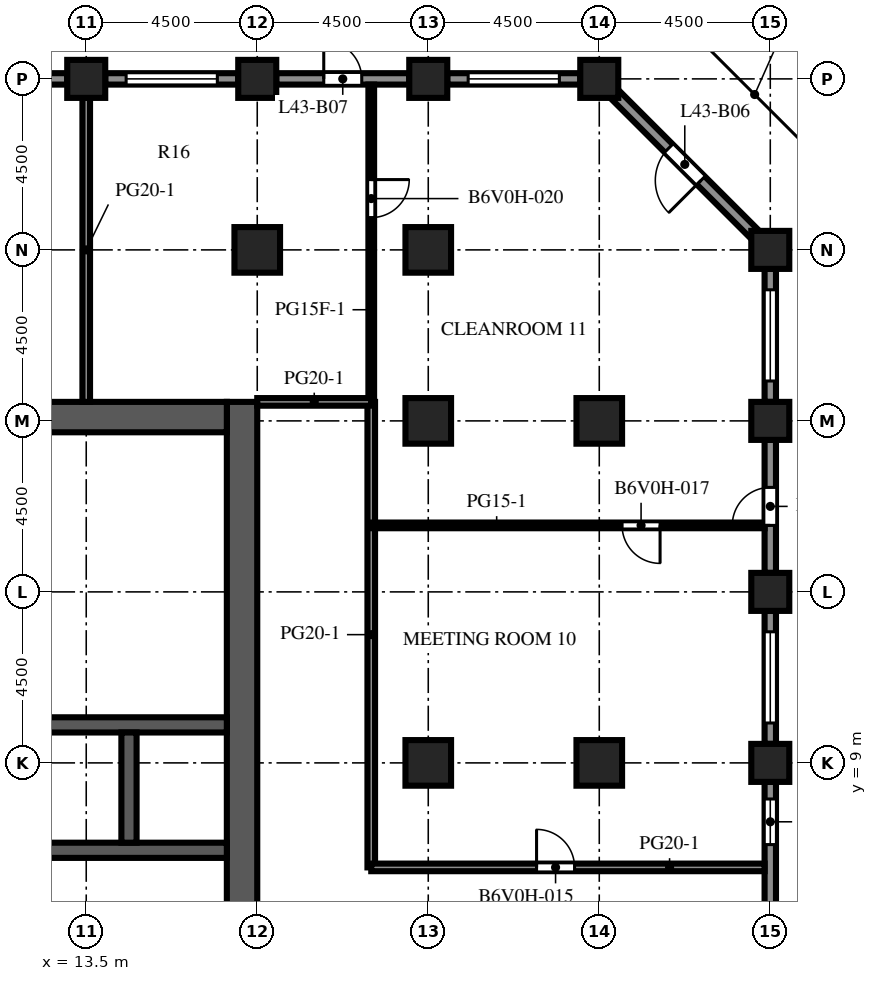
"""IFC4 building model, lengths in metres.
Left out: names, types, materials, properties, quantities, classifications, styles, units other than length and angle.
Written with IfcOpenShell. Run it as: python <this file> out.ifc"""

import sys

from ifc_helpers import new_model, si_unit, direction, frame, frame_2d, origin, origin_2d, place, context, subcontext, project, spatial, rectangle, extrude, element, fill, save


model = new_model("IFC4")
c1 = context("Model", 3, precision=1e-05, world=origin(), true_north=direction((0.0, 1.0)))
c2 = subcontext(c1, "Body", "Model", "MODEL_VIEW")
j1 = project(units=[si_unit("LENGTHUNIT", "METRE"), si_unit("PLANEANGLEUNIT", "RADIAN")], contexts=[c1])
p1 = place(None, origin())
s1 = spatial("IfcSite", under=j1, at=p1, CompositionType="ELEMENT")
p2 = place(p1, origin())
s2 = spatial("IfcBuilding", under=s1, at=p2, CompositionType="ELEMENT")
p3 = place(p2, frame((0.0, 0.0, 191.5)))
s3 = spatial("IfcBuildingStorey", under=s2, at=p3, CompositionType="ELEMENT", Elevation=191.5)
for number, where, z_axis, x_axis in (
    (1, (13.5, 27.0, 0.0), (0.0, 0.0, 1.0), (1.0, 0.0, 0.0)),
    (2, (18.0, 27.0, 0.0), (0.0, 0.0, 1.0), (1.0, 0.0, 0.0)),
    (3, (22.5, 27.0, 0.0), (0.0, 0.0, 1.0), (1.0, 0.0, 0.0)),
    (4, (27.0, 27.0, 0.0), (0.0, 0.0, 1.0), (1.0, 0.0, 0.0)),
):
    element("IfcColumn", number, at=place(p3, frame(where, z_axis=z_axis, x_axis=x_axis)), inside=s3, PredefinedType="COLUMN", context=c2, shape_type="SweptSolid", body=[
        extrude(rectangle(XDim=1.0, YDim=1.0, at=origin_2d()), origin(), (0.0, 0.0, 1.0), 4.1),
    ])
for number, where, z_axis, x_axis in (
    (5, (31.5, 9.0, -0.45), (0.0, 0.0, 1.0), (1.0, 0.0, 0.0)),
    (6, (31.5, 13.5, -0.45), (0.0, 0.0, 1.0), (1.0, 0.0, 0.0)),
    (7, (31.5, 18.0, -0.45), (0.0, 0.0, 1.0), (1.0, 0.0, 0.0)),
    (8, (31.5, 22.5, -0.45), (0.0, 0.0, 1.0), (1.0, 0.0, 0.0)),
):
    element("IfcColumn", number, at=place(p3, frame(where, z_axis=z_axis, x_axis=x_axis)), inside=s3, PredefinedType="COLUMN", context=c2, shape_type="SweptSolid", body=[
        extrude(rectangle(XDim=1.0, YDim=1.0, at=origin_2d()), origin(), (0.0, 0.0, 1.0), 4.55),
    ])
p4 = place(p3, frame((18.0, 22.5, 0.0), z_axis=(0.0, 0.0, 1.0), x_axis=(1.0, 0.0, 0.0)))
e9 = element("IfcColumn", 9, at=p4, inside=s3, PredefinedType="COLUMN", context=c2, shape_type="SweptSolid", body=[
    extrude(rectangle(XDim=1.2, YDim=1.2, at=origin_2d()), origin(), (0.0, 0.0, 1.0), 4.1),
])
for number, where, z_axis, x_axis in (
    (10, (22.5, 9.0, -0.45), (0.0, 0.0, 1.0), (1.0, 0.0, 0.0)),
    (11, (22.5, 18.0, -0.45), (0.0, 0.0, 1.0), (1.0, 0.0, 0.0)),
):
    element("IfcColumn", number, at=place(p3, frame(where, z_axis=z_axis, x_axis=x_axis)), inside=s3, PredefinedType="COLUMN", context=c2, shape_type="SweptSolid", body=[
        extrude(rectangle(XDim=1.2, YDim=1.2, at=origin_2d()), origin(), (0.0, 0.0, 1.0), 4.55),
    ])
p5 = place(p3, frame((22.5, 22.5, 0.0), z_axis=(0.0, 0.0, 1.0), x_axis=(1.0, 0.0, 0.0)))
e12 = element("IfcColumn", 12, at=p5, inside=s3, PredefinedType="COLUMN", context=c2, shape_type="SweptSolid", body=[
    extrude(rectangle(XDim=1.2, YDim=1.2, at=origin_2d()), origin(), (0.0, 0.0, 1.0), 4.1),
])
for number, where, z_axis, x_axis in (
    (13, (27.0, 9.0, -0.45), (0.0, 0.0, 1.0), (1.0, 0.0, 0.0)),
    (14, (27.0, 18.0, -0.45), (0.0, 0.0, 1.0), (1.0, 0.0, 0.0)),
):
    element("IfcColumn", number, at=place(p3, frame(where, z_axis=z_axis, x_axis=x_axis)), inside=s3, PredefinedType="COLUMN", context=c2, shape_type="SweptSolid", body=[
        extrude(rectangle(XDim=1.2, YDim=1.2, at=origin_2d()), origin(), (0.0, 0.0, 1.0), 4.55),
    ])
p6 = place(p3, frame((17.6, -9.0, 0.0), z_axis=(0.0, 0.0, 1.0), x_axis=(0.0, 1.0, 0.0)))
e15 = element("IfcWall", 15, at=p6, inside=s3, PredefinedType="SHEAR", context=c2, shape_type="SweptSolid", body=[
    extrude(rectangle(XDim=27.5, YDim=0.8, at=frame_2d((13.75, 0.0))), origin(), (0.0, 0.0, 1.0), 4.1),
])
p7 = place(p6, frame((12.55, 0.0, 0.0)))
e16 = element("IfcOpeningElement", 16, at=p7, cuts=e15, PredefinedType="OPENING", context=c2, shape_type="SweptSolid", body=[
    extrude(rectangle(XDim=2.4, YDim=2.4, at=frame_2d((1.2, 1.2))), frame((0.0, 0.41, 0.0), z_axis=(0.0, -1.0, 0.0), x_axis=(1.0, 0.0, 0.0)), (0.0, 0.0, 1.0), 0.82),
])
p8 = place(p6, frame((6.825, 0.0, 0.0)))
e17 = element("IfcOpeningElement", 17, at=p8, cuts=e15, PredefinedType="OPENING", context=c2, shape_type="SweptSolid", body=[
    extrude(rectangle(XDim=1.2, YDim=2.1, at=frame_2d((0.6, 1.05))), frame((0.0, 0.41, 0.0), z_axis=(0.0, -1.0, 0.0), x_axis=(1.0, 0.0, 0.0)), (0.0, 0.0, 1.0), 0.82),
])
p9 = place(p6, frame((19.475, 0.0, 0.0)))
e18 = element("IfcOpeningElement", 18, at=p9, cuts=e15, PredefinedType="OPENING", context=c2, shape_type="SweptSolid", body=[
    extrude(rectangle(XDim=1.2, YDim=2.1, at=frame_2d((0.6, 1.05))), frame((0.0, 0.41, 0.0), z_axis=(0.0, -1.0, 0.0), x_axis=(1.0, 0.0, 0.0)), (0.0, 0.0, 1.0), 0.82),
])
p10 = place(p3, frame((6.8, 18.1, 0.0), z_axis=(0.0, 0.0, 1.0), x_axis=(1.0, 0.0, 0.0)))
e19 = element("IfcWall", 19, at=p10, inside=s3, PredefinedType="SHEAR", context=c2, shape_type="SweptSolid", body=[
    extrude(rectangle(XDim=10.4, YDim=0.8, at=frame_2d((5.2, 0.0))), origin(), (0.0, 0.0, 1.0), 4.1),
])
p11 = place(p3, frame((6.8, 6.7, 0.0), z_axis=(0.0, 0.0, 1.0), x_axis=(1.0, 0.0, 0.0)))
e20 = element("IfcWall", 20, at=p11, inside=s3, PredefinedType="SHEAR", context=c2, shape_type="SweptSolid", body=[
    extrude(rectangle(XDim=10.4, YDim=0.4, at=frame_2d((5.2, 0.0))), origin(), (0.0, 0.0, 1.0), 4.1),
])
p12 = place(p11, frame((3.337, 0.0, 0.0)))
e21 = element("IfcOpeningElement", 21, at=p12, cuts=e20, PredefinedType="OPENING", context=c2, shape_type="SweptSolid", body=[
    extrude(rectangle(XDim=1.1, YDim=2.1, at=frame_2d((0.55, 1.05))), frame((0.0, 0.21, 0.0), z_axis=(0.0, -1.0, 0.0), x_axis=(1.0, 0.0, 0.0)), (0.0, 0.0, 1.0), 0.42),
])
p13 = place(p11, frame((5.962, 0.0, 0.0)))
e22 = element("IfcOpeningElement", 22, at=p13, cuts=e20, PredefinedType="OPENING", context=c2, shape_type="SweptSolid", body=[
    extrude(rectangle(XDim=1.1, YDim=2.1, at=frame_2d((0.55, 1.05))), frame((0.0, 0.21, 0.0), z_axis=(0.0, -1.0, 0.0), x_axis=(1.0, 0.0, 0.0)), (0.0, 0.0, 1.0), 0.42),
])
p14 = place(p11, frame((8.663, 0.0, 0.0)))
e23 = element("IfcOpeningElement", 23, at=p14, cuts=e20, PredefinedType="OPENING", context=c2, shape_type="SweptSolid", body=[
    extrude(rectangle(XDim=1.1, YDim=2.1, at=frame_2d((0.55, 1.05))), frame((0.0, 0.21, 0.0), z_axis=(0.0, -1.0, 0.0), x_axis=(1.0, 0.0, 0.0)), (0.0, 0.0, 1.0), 0.42),
])
p15 = place(p11, frame((0.688, 0.0, 0.0)))
e24 = element("IfcOpeningElement", 24, at=p15, cuts=e20, PredefinedType="OPENING", context=c2, shape_type="SweptSolid", body=[
    extrude(rectangle(XDim=1.0, YDim=2.1, at=frame_2d((0.5, 1.05))), frame((0.0, 0.21, 0.0), z_axis=(0.0, -1.0, 0.0), x_axis=(1.0, 0.0, 0.0)), (0.0, 0.0, 1.0), 0.42),
])
p16 = place(p3, frame((6.8, 10.0, 0.0), z_axis=(0.0, 0.0, 1.0), x_axis=(1.0, 0.0, 0.0)))
e25 = element("IfcWall", 25, at=p16, inside=s3, PredefinedType="SHEAR", context=c2, shape_type="SweptSolid", body=[
    extrude(rectangle(XDim=10.4, YDim=0.4, at=frame_2d((5.2, 0.0))), origin(), (0.0, 0.0, 1.0), 4.1),
])
p17 = place(p3, frame((14.625, 6.9, 0.0), z_axis=(0.0, 0.0, 1.0), x_axis=(0.0, 1.0, 0.0)))
e26 = element("IfcWall", 26, at=p17, inside=s3, PredefinedType="SHEAR", context=c2, shape_type="SweptSolid", body=[
    extrude(rectangle(XDim=2.9, YDim=0.4, at=frame_2d((1.45, 0.0))), origin(), (0.0, 0.0, 1.0), 4.1),
])
p18 = place(p3, frame((31.5, 8.5, 0.0), z_axis=(0.0, 0.0, 1.0), x_axis=(0.0, -1.0, 0.0)))
e27 = element("IfcWall", 27, at=p18, inside=s3, PredefinedType="SOLIDWALL", context=c2, shape_type="SweptSolid", body=[
    extrude(rectangle(XDim=3.5, YDim=0.3, at=frame_2d((1.75, 0.0))), origin(), (0.0, 0.0, 1.0), 2.85),
])
p19 = place(p18, frame((0.45, 0.0, 0.8)))
e28 = element("IfcOpeningElement", 28, at=p19, cuts=e27, PredefinedType="OPENING", context=c2, shape_type="SweptSolid", body=[
    extrude(rectangle(XDim=1.2, YDim=1.7, at=frame_2d((0.6, 0.85))), frame((0.0, 0.16, 0.0), z_axis=(0.0, -1.0, 0.0), x_axis=(1.0, 0.0, 0.0)), (0.0, 0.0, 1.0), 0.32),
])
p20 = place(p3, frame((31.5, 13.0, 0.0), z_axis=(0.0, 0.0, 1.0), x_axis=(0.0, -1.0, 0.0)))
e29 = element("IfcWall", 29, at=p20, inside=s3, PredefinedType="SOLIDWALL", context=c2, shape_type="SweptSolid", body=[
    extrude(rectangle(XDim=3.5, YDim=0.3, at=frame_2d((1.75, 0.0))), origin(), (0.0, 0.0, 1.0), 2.85),
])
p21 = place(p20, frame((0.55, 0.0, 0.8)))
e30 = element("IfcOpeningElement", 30, at=p21, cuts=e29, PredefinedType="OPENING", context=c2, shape_type="SweptSolid", body=[
    extrude(rectangle(XDim=2.4, YDim=1.7, at=frame_2d((1.2, 0.85))), frame((0.0, 0.16, 0.0), z_axis=(0.0, -1.0, 0.0), x_axis=(1.0, 0.0, 0.0)), (0.0, 0.0, 1.0), 0.32),
])
p22 = place(p3, frame((31.5, 17.5, 0.0), z_axis=(0.0, 0.0, 1.0), x_axis=(0.0, -1.0, 0.0)))
e31 = element("IfcWall", 31, at=p22, inside=s3, PredefinedType="SOLIDWALL", context=c2, shape_type="SweptSolid", body=[
    extrude(rectangle(XDim=3.5, YDim=0.3, at=frame_2d((1.75, 0.0))), origin(), (0.0, 0.0, 1.0), 2.85),
])
p23 = place(p22, frame((1.25, 0.0, 0.0)))
e32 = element("IfcOpeningElement", 32, at=p23, cuts=e31, PredefinedType="OPENING", context=c2, shape_type="SweptSolid", body=[
    extrude(rectangle(XDim=1.0, YDim=2.2, at=frame_2d((0.5, 1.1))), frame((0.0, 0.16, 0.0), z_axis=(0.0, -1.0, 0.0), x_axis=(1.0, 0.0, 0.0)), (0.0, 0.0, 1.0), 0.32),
])
p24 = place(p3, frame((31.5, 22.0, 0.0), z_axis=(0.0, 0.0, 1.0), x_axis=(0.0, -1.0, 0.0)))
e33 = element("IfcWall", 33, at=p24, inside=s3, PredefinedType="SOLIDWALL", context=c2, shape_type="SweptSolid", body=[
    extrude(rectangle(XDim=3.5, YDim=0.3, at=frame_2d((1.75, 0.0))), origin(), (0.0, 0.0, 1.0), 2.85),
])
p25 = place(p24, frame((0.55, 0.0, 0.8)))
e34 = element("IfcOpeningElement", 34, at=p25, cuts=e33, PredefinedType="OPENING", context=c2, shape_type="SweptSolid", body=[
    extrude(rectangle(XDim=2.4, YDim=1.7, at=frame_2d((1.2, 0.85))), frame((0.0, 0.16, 0.0), z_axis=(0.0, -1.0, 0.0), x_axis=(1.0, 0.0, 0.0)), (0.0, 0.0, 1.0), 0.32),
])
p26 = place(p3, frame((27.394, 26.606, 0.0), z_axis=(0.0, 0.0, 1.0), x_axis=(0.707106781187, -0.707106781187, 0.0)))
e35 = element("IfcWall", 35, at=p26, inside=s3, PredefinedType="SOLIDWALL", context=c2, shape_type="SweptSolid", body=[
    extrude(rectangle(XDim=5.25, YDim=0.3, at=frame_2d((2.625, 0.0))), origin(), (0.0, 0.0, 1.0), 2.85),
])
p27 = place(p26, frame((2.025, 0.0, 0.0)))
e36 = element("IfcOpeningElement", 36, at=p27, cuts=e35, PredefinedType="OPENING", context=c2, shape_type="SweptSolid", body=[
    extrude(rectangle(XDim=1.2, YDim=2.2, at=frame_2d((0.6, 1.1))), frame((0.0, 0.16, 0.0), z_axis=(0.0, -1.0, 0.0), x_axis=(1.0, 0.0, 0.0)), (0.0, 0.0, 1.0), 0.32),
])
p28 = place(p3, frame((23.0, 27.0, 0.0), z_axis=(0.0, 0.0, 1.0), x_axis=(1.0, 0.0, 0.0)))
e37 = element("IfcWall", 37, at=p28, inside=s3, PredefinedType="SOLIDWALL", context=c2, shape_type="SweptSolid", body=[
    extrude(rectangle(XDim=3.5, YDim=0.3, at=frame_2d((1.75, 0.0))), origin(), (0.0, 0.0, 1.0), 2.85),
])
p29 = place(p28, frame((0.55, 0.0, 0.8)))
e38 = element("IfcOpeningElement", 38, at=p29, cuts=e37, PredefinedType="OPENING", context=c2, shape_type="SweptSolid", body=[
    extrude(rectangle(XDim=2.4, YDim=1.7, at=frame_2d((1.2, 0.85))), frame((0.0, 0.16, 0.0), z_axis=(0.0, -1.0, 0.0), x_axis=(1.0, 0.0, 0.0)), (0.0, 0.0, 1.0), 0.32),
])
p30 = place(p3, frame((18.5, 27.0, 0.0), z_axis=(0.0, 0.0, 1.0), x_axis=(1.0, 0.0, 0.0)))
e39 = element("IfcWall", 39, at=p30, inside=s3, PredefinedType="SOLIDWALL", context=c2, shape_type="SweptSolid", body=[
    extrude(rectangle(XDim=3.5, YDim=0.3, at=frame_2d((1.75, 0.0))), origin(), (0.0, 0.0, 1.0), 2.85),
])
p31 = place(p30, frame((1.25, 0.0, 0.0)))
e40 = element("IfcOpeningElement", 40, at=p31, cuts=e39, PredefinedType="OPENING", context=c2, shape_type="SweptSolid", body=[
    extrude(rectangle(XDim=1.0, YDim=2.2, at=frame_2d((0.5, 1.1))), frame((0.0, 0.16, 0.0), z_axis=(0.0, -1.0, 0.0), x_axis=(1.0, 0.0, 0.0)), (0.0, 0.0, 1.0), 0.32),
])
p32 = place(p3, frame((14.0, 27.0, 0.0), z_axis=(0.0, 0.0, 1.0), x_axis=(1.0, 0.0, 0.0)))
e41 = element("IfcWall", 41, at=p32, inside=s3, PredefinedType="SOLIDWALL", context=c2, shape_type="SweptSolid", body=[
    extrude(rectangle(XDim=3.5, YDim=0.3, at=frame_2d((1.75, 0.0))), origin(), (0.0, 0.0, 1.0), 2.85),
])
p33 = place(p32, frame((0.55, 0.0, 0.8)))
e42 = element("IfcOpeningElement", 42, at=p33, cuts=e41, PredefinedType="OPENING", context=c2, shape_type="SweptSolid", body=[
    extrude(rectangle(XDim=2.4, YDim=1.7, at=frame_2d((1.2, 0.85))), frame((0.0, 0.16, 0.0), z_axis=(0.0, -1.0, 0.0), x_axis=(1.0, 0.0, 0.0)), (0.0, 0.0, 1.0), 0.32),
])
p34 = place(p3, frame((9.5, 27.0, 0.0), z_axis=(0.0, 0.0, 1.0), x_axis=(1.0, 0.0, 0.0)))
e43 = element("IfcWall", 43, at=p34, inside=s3, PredefinedType="SOLIDWALL", context=c2, shape_type="SweptSolid", body=[
    extrude(rectangle(XDim=3.5, YDim=0.3, at=frame_2d((1.75, 0.0))), origin(), (0.0, 0.0, 1.0), 2.85),
])
p35 = place(p34, frame((0.55, 0.0, 0.8)))
e44 = element("IfcOpeningElement", 44, at=p35, cuts=e43, PredefinedType="OPENING", context=c2, shape_type="SweptSolid", body=[
    extrude(rectangle(XDim=2.4, YDim=1.7, at=frame_2d((1.2, 0.85))), frame((0.0, 0.16, 0.0), z_axis=(0.0, -1.0, 0.0), x_axis=(1.0, 0.0, 0.0)), (0.0, 0.0, 1.0), 0.32),
])
p36 = place(p3, frame((13.5, 18.5, 0.0), z_axis=(0.0, 0.0, 1.0), x_axis=(0.0, 1.0, 0.0)))
e45 = element("IfcWall", 45, at=p36, inside=s3, PredefinedType="PARTITIONING", context=c2, shape_type="SweptSolid", body=[
    extrude(rectangle(XDim=8.0, YDim=0.2, at=frame_2d((4.0, 0.0))), origin(), (0.0, 0.0, 1.0), 3.65),
])
p37 = place(p3, frame((21.0, 18.5, 0.0), z_axis=(0.0, 0.0, 1.0), x_axis=(0.0, 1.0, 0.0)))
e46 = element("IfcWall", 46, at=p37, inside=s3, PredefinedType="PARTITIONING", context=c2, shape_type="SweptSolid", body=[
    extrude(rectangle(XDim=8.35, YDim=0.15, at=frame_2d((4.175, 0.0))), origin(), (0.0, 0.0, 1.0), 3.65),
])
p38 = place(p37, frame((4.85, 0.0, 0.0)))
e47 = element("IfcOpeningElement", 47, at=p38, cuts=e46, PredefinedType="OPENING", context=c2, shape_type="SweptSolid", body=[
    extrude(rectangle(XDim=1.0, YDim=2.1, at=frame_2d((0.5, 1.05))), frame((0.0, 0.085, 0.0), z_axis=(0.0, -1.0, 0.0), x_axis=(1.0, 0.0, 0.0)), (0.0, 0.0, 1.0), 0.17),
])
p39 = place(p3, frame((21.0, 6.25, 0.0), z_axis=(0.0, 0.0, 1.0), x_axis=(0.0, 1.0, 0.0)))
e48 = element("IfcWall", 48, at=p39, inside=s3, PredefinedType="PARTITIONING", context=c2, shape_type="SweptSolid", body=[
    extrude(rectangle(XDim=12.25, YDim=0.2, at=frame_2d((6.125, 0.0))), origin(), (0.0, 0.0, 1.0), 3.65),
])
p40 = place(p3, frame((21.0, 6.25, 0.0), z_axis=(0.0, 0.0, 1.0), x_axis=(1.0, 0.0, 0.0)))
e49 = element("IfcWall", 49, at=p40, inside=s3, PredefinedType="PARTITIONING", context=c2, shape_type="SweptSolid", body=[
    extrude(rectangle(XDim=10.35, YDim=0.2, at=frame_2d((5.175, 0.0))), origin(), (0.0, 0.0, 1.0), 3.65),
])
p41 = place(p40, frame((4.35, 0.0, 0.0)))
e50 = element("IfcOpeningElement", 50, at=p41, cuts=e49, PredefinedType="OPENING", context=c2, shape_type="SweptSolid", body=[
    extrude(rectangle(XDim=1.0, YDim=2.1, at=frame_2d((0.5, 1.05))), frame((0.0, 0.11, 0.0), z_axis=(0.0, -1.0, 0.0), x_axis=(1.0, 0.0, 0.0)), (0.0, 0.0, 1.0), 0.22),
])
p42 = place(p3, frame((21.0, 15.25, 0.0), z_axis=(0.0, 0.0, 1.0), x_axis=(1.0, 0.0, 0.0)))
e51 = element("IfcWall", 51, at=p42, inside=s3, PredefinedType="PARTITIONING", context=c2, shape_type="SweptSolid", body=[
    extrude(rectangle(XDim=10.35, YDim=0.15, at=frame_2d((5.175, 0.0))), origin(), (0.0, 0.0, 1.0), 3.65),
])
p43 = place(p42, frame((6.6, 0.0, 0.0)))
e52 = element("IfcOpeningElement", 52, at=p43, cuts=e51, PredefinedType="OPENING", context=c2, shape_type="SweptSolid", body=[
    extrude(rectangle(XDim=1.0, YDim=2.1, at=frame_2d((0.5, 1.05))), frame((0.0, 0.085, 0.0), z_axis=(0.0, -1.0, 0.0), x_axis=(1.0, 0.0, 0.0)), (0.0, 0.0, 1.0), 0.17),
])
p44 = place(p3, frame((18.0, 18.5, 0.0), z_axis=(0.0, 0.0, 1.0), x_axis=(1.0, 0.0, 0.0)))
e53 = element("IfcWall", 53, at=p44, inside=s3, PredefinedType="PARTITIONING", context=c2, shape_type="SweptSolid", body=[
    extrude(rectangle(XDim=3.0, YDim=0.2, at=frame_2d((1.5, 0.0))), origin(), (0.0, 0.0, 1.0), 3.65),
])
p45 = place(p19, origin())
e54 = element("IfcWindow", 54, at=p45, inside=s3, PartitioningType="SINGLE_PANEL", PredefinedType="WINDOW", context=c2, shape_type="SweptSolid", body=[
    extrude(rectangle(XDim=1.2, YDim=1.7, at=frame_2d((0.6, 0.85))), frame((0.0, 0.03, 0.0), z_axis=(0.0, -1.0, 0.0), x_axis=(1.0, 0.0, 0.0)), (0.0, 0.0, 1.0), 0.06),
])
fill(e28, e54)
p46 = place(p21, origin())
e55 = element("IfcWindow", 55, at=p46, inside=s3, PartitioningType="SINGLE_PANEL", PredefinedType="WINDOW", context=c2, shape_type="SweptSolid", body=[
    extrude(rectangle(XDim=2.4, YDim=1.7, at=frame_2d((1.2, 0.85))), frame((0.0, 0.03, 0.0), z_axis=(0.0, -1.0, 0.0), x_axis=(1.0, 0.0, 0.0)), (0.0, 0.0, 1.0), 0.06),
])
fill(e30, e55)
p47 = place(p23, origin())
e56 = element("IfcDoor", 56, at=p47, inside=s3, OperationType="SINGLE_SWING_RIGHT", PredefinedType="DOOR", context=c2, shape_type="SweptSolid", body=[
    extrude(rectangle(XDim=1.0, YDim=2.2, at=frame_2d((0.5, 1.1))), frame((0.0, 0.025, 0.0), z_axis=(0.0, -1.0, 0.0), x_axis=(1.0, 0.0, 0.0)), (0.0, 0.0, 1.0), 0.05),
])
fill(e32, e56)
p48 = place(p25, origin())
e57 = element("IfcWindow", 57, at=p48, inside=s3, PartitioningType="SINGLE_PANEL", PredefinedType="WINDOW", context=c2, shape_type="SweptSolid", body=[
    extrude(rectangle(XDim=2.4, YDim=1.7, at=frame_2d((1.2, 0.85))), frame((0.0, 0.03, 0.0), z_axis=(0.0, -1.0, 0.0), x_axis=(1.0, 0.0, 0.0)), (0.0, 0.0, 1.0), 0.06),
])
fill(e34, e57)
p49 = place(p27, origin())
e58 = element("IfcDoor", 58, at=p49, inside=s3, OperationType="SINGLE_SWING_RIGHT", PredefinedType="DOOR", context=c2, shape_type="SweptSolid", body=[
    extrude(rectangle(XDim=1.2, YDim=2.2, at=frame_2d((0.6, 1.1))), frame((0.0, 0.025, 0.0), z_axis=(0.0, -1.0, 0.0), x_axis=(1.0, 0.0, 0.0)), (0.0, 0.0, 1.0), 0.05),
])
fill(e36, e58)
p50 = place(p29, origin())
e59 = element("IfcWindow", 59, at=p50, inside=s3, PartitioningType="SINGLE_PANEL", PredefinedType="WINDOW", context=c2, shape_type="SweptSolid", body=[
    extrude(rectangle(XDim=2.4, YDim=1.7, at=frame_2d((1.2, 0.85))), frame((0.0, 0.03, 0.0), z_axis=(0.0, -1.0, 0.0), x_axis=(1.0, 0.0, 0.0)), (0.0, 0.0, 1.0), 0.06),
])
fill(e38, e59)
p51 = place(p31, origin())
e60 = element("IfcDoor", 60, at=p51, inside=s3, OperationType="SINGLE_SWING_LEFT", PredefinedType="DOOR", context=c2, shape_type="SweptSolid", body=[
    extrude(rectangle(XDim=1.0, YDim=2.2, at=frame_2d((0.5, 1.1))), frame((0.0, 0.025, 0.0), z_axis=(0.0, -1.0, 0.0), x_axis=(1.0, 0.0, 0.0)), (0.0, 0.0, 1.0), 0.05),
])
fill(e40, e60)
p52 = place(p33, origin())
e61 = element("IfcWindow", 61, at=p52, inside=s3, PartitioningType="SINGLE_PANEL", PredefinedType="WINDOW", context=c2, shape_type="SweptSolid", body=[
    extrude(rectangle(XDim=2.4, YDim=1.7, at=frame_2d((1.2, 0.85))), frame((0.0, 0.03, 0.0), z_axis=(0.0, -1.0, 0.0), x_axis=(1.0, 0.0, 0.0)), (0.0, 0.0, 1.0), 0.06),
])
fill(e42, e61)
p53 = place(p13, origin())
e62 = element("IfcDoor", 62, at=p53, inside=s3, OperationType="DOUBLE_DOOR_SLIDING", PredefinedType="DOOR", context=c2, shape_type="SweptSolid", body=[
    extrude(rectangle(XDim=1.1, YDim=2.1, at=frame_2d((0.55, 1.05))), frame((0.0, 0.025, 0.0), z_axis=(0.0, -1.0, 0.0), x_axis=(1.0, 0.0, 0.0)), (0.0, 0.0, 1.0), 0.05),
])
fill(e22, e62)
p54 = place(p14, origin())
e63 = element("IfcDoor", 63, at=p54, inside=s3, OperationType="DOUBLE_DOOR_SLIDING", PredefinedType="DOOR", context=c2, shape_type="SweptSolid", body=[
    extrude(rectangle(XDim=1.1, YDim=2.1, at=frame_2d((0.55, 1.05))), frame((0.0, 0.025, 0.0), z_axis=(0.0, -1.0, 0.0), x_axis=(1.0, 0.0, 0.0)), (0.0, 0.0, 1.0), 0.05),
])
fill(e23, e63)
p55 = place(p7, origin())
e64 = element("IfcDoor", 64, at=p55, inside=s3, OperationType="DOUBLE_DOOR_DOUBLE_SWING", PredefinedType="DOOR", context=c2, shape_type="SweptSolid", body=[
    extrude(rectangle(XDim=2.4, YDim=2.4, at=frame_2d((1.2, 1.2))), frame((0.0, 0.025, 0.0), z_axis=(0.0, -1.0, 0.0), x_axis=(1.0, 0.0, 0.0)), (0.0, 0.0, 1.0), 0.05),
])
fill(e16, e64)
p56 = place(p9, frame((1.2, 0.0, 0.0), z_axis=(0.0, 0.0, 1.0), x_axis=(-1.0, 0.0, 0.0)))
e65 = element("IfcDoor", 65, at=p56, inside=s3, OperationType="SINGLE_SWING_LEFT", PredefinedType="DOOR", context=c2, shape_type="SweptSolid", body=[
    extrude(rectangle(XDim=1.2, YDim=2.1, at=frame_2d((0.6, 1.05))), frame((0.0, 0.025, 0.0), z_axis=(0.0, -1.0, 0.0), x_axis=(1.0, 0.0, 0.0)), (0.0, 0.0, 1.0), 0.05),
])
fill(e18, e65)
p57 = place(p41, origin())
e66 = element("IfcDoor", 66, at=p57, inside=s3, OperationType="SINGLE_SWING_LEFT", PredefinedType="DOOR", context=c2, shape_type="SweptSolid", body=[
    extrude(rectangle(XDim=1.0, YDim=2.1, at=frame_2d((0.5, 1.05))), frame((0.0, 0.025, 0.0), z_axis=(0.0, -1.0, 0.0), x_axis=(1.0, 0.0, 0.0)), (0.0, 0.0, 1.0), 0.05),
])
fill(e50, e66)
p58 = place(p43, origin())
e67 = element("IfcDoor", 67, at=p58, inside=s3, OperationType="SINGLE_SWING_RIGHT", PredefinedType="DOOR", context=c2, shape_type="SweptSolid", body=[
    extrude(rectangle(XDim=1.0, YDim=2.1, at=frame_2d((0.5, 1.05))), frame((0.0, 0.025, 0.0), z_axis=(0.0, -1.0, 0.0), x_axis=(1.0, 0.0, 0.0)), (0.0, 0.0, 1.0), 0.05),
])
fill(e52, e67)
p59 = place(p38, origin())
e68 = element("IfcDoor", 68, at=p59, inside=s3, OperationType="SINGLE_SWING_RIGHT", PredefinedType="DOOR", context=c2, shape_type="SweptSolid", body=[
    extrude(rectangle(XDim=1.0, YDim=2.1, at=frame_2d((0.5, 1.05))), frame((0.0, 0.025, 0.0), z_axis=(0.0, -1.0, 0.0), x_axis=(1.0, 0.0, 0.0)), (0.0, 0.0, 1.0), 0.05),
])
fill(e47, e68)
save(model, sys.argv[1])
